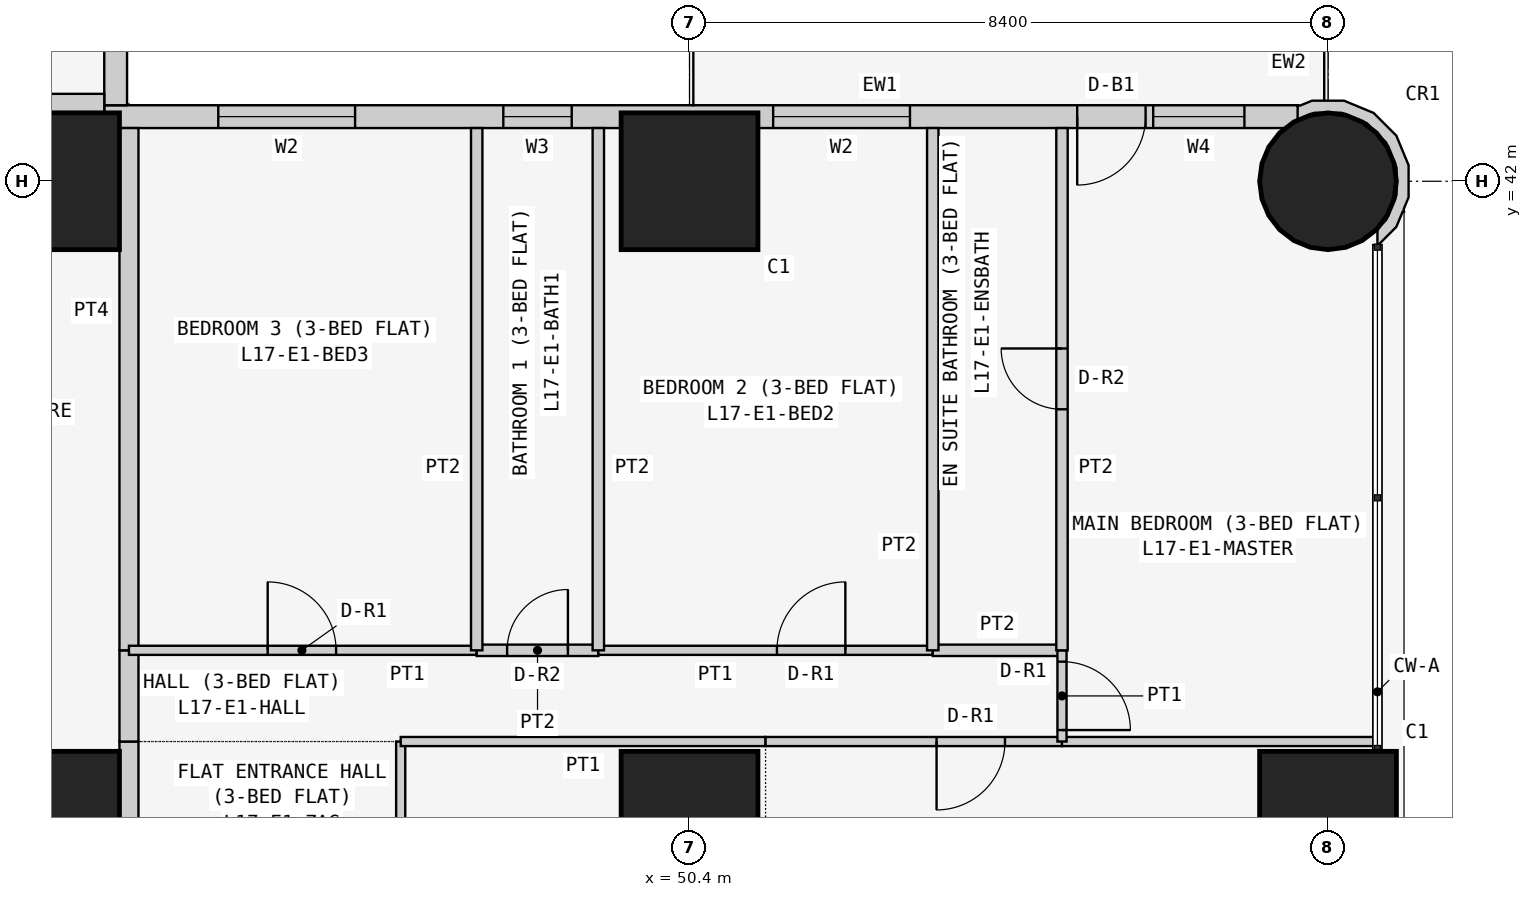
"""IFC4 building model, lengths in metres.
Left out: names, types, materials, properties, quantities, classifications, styles, units other than length and angle.
Written with IfcOpenShell. Run it as: python <this file> out.ifc"""

import sys

from ifc_helpers import new_model, si_unit, direction, frame, frame_2d, origin, origin_2d, place, context, subcontext, project, spatial, polyline, rectangle, circle, outline, extrude, element, fill, save


model = new_model("IFC4")
c1 = context("Model", 3, precision=1e-05, world=origin(), true_north=direction((0.0, 1.0)))
c2 = subcontext(c1, "Body", "Model", "MODEL_VIEW")
j1 = project(units=[si_unit("LENGTHUNIT", "METRE"), si_unit("PLANEANGLEUNIT", "RADIAN")], contexts=[c1])
p1 = place(None, origin())
s1 = spatial("IfcSite", under=j1, at=p1, CompositionType="ELEMENT")
p2 = place(p1, origin())
s2 = spatial("IfcBuilding", under=s1, at=p2, CompositionType="ELEMENT")
p3 = place(p2, frame((0.0, 0.0, 70.5)))
s3 = spatial("IfcBuildingStorey", under=s2, at=p3, CompositionType="ELEMENT", Elevation=70.5)
for number, where, z_axis, x_axis in (
    (1, (42.0, 33.6, 0.0), (0.0, 0.0, 1.0), (1.0, 0.0, 0.0)),
    (2, (42.0, 42.0, 0.0), (0.0, 0.0, 1.0), (1.0, 0.0, 0.0)),
    (3, (50.4, 33.6, 0.0), (0.0, 0.0, 1.0), (1.0, 0.0, 0.0)),
    (4, (50.4, 42.0, 0.0), (0.0, 0.0, 1.0), (1.0, 0.0, 0.0)),
    (5, (58.8, 33.6, 0.0), (0.0, 0.0, 1.0), (1.0, 0.0, 0.0)),
):
    element("IfcColumn", number, at=place(p3, frame(where, z_axis=z_axis, x_axis=x_axis)), inside=s3, PredefinedType="COLUMN", context=c2, shape_type="SweptSolid", body=[
        extrude(rectangle(XDim=1.8, YDim=1.8, at=origin_2d()), origin(), (0.0, 0.0, 1.0), 3.6),
    ])
p4 = place(p3, frame((58.8, 42.0, 0.0), z_axis=(0.0, 0.0, 1.0), x_axis=(1.0, 0.0, 0.0)))
e6 = element("IfcColumn", 6, at=p4, inside=s3, PredefinedType="COLUMN", context=c2, shape_type="SweptSolid", body=[
    extrude(circle(Radius=0.9, at=origin_2d()), origin(), (0.0, 0.0, 1.0), 3.6),
])
p5 = place(p3, frame((58.4, 42.85, 0.0), z_axis=(0.0, 0.0, 1.0), x_axis=(-1.0, 0.0, 0.0)))
e7 = element("IfcWall", 7, at=p5, inside=s3, PredefinedType="SOLIDWALL", context=c2, shape_type="SweptSolid", body=[
    extrude(rectangle(XDim=15.7, YDim=0.3, at=frame_2d((7.85, 0.0))), origin(), (0.0, 0.0, 1.0), 3.45),
])
p6 = place(p5, frame((12.4, 0.0, 0.9)))
e8 = element("IfcOpeningElement", 8, at=p6, cuts=e7, PredefinedType="OPENING", context=c2, shape_type="SweptSolid", body=[
    extrude(rectangle(XDim=1.8, YDim=1.5, at=frame_2d((0.9, 0.75))), frame((0.0, 0.16, 0.0), z_axis=(0.0, -1.0, 0.0), x_axis=(1.0, 0.0, 0.0)), (0.0, 0.0, 1.0), 0.32),
])
p7 = place(p5, frame((9.55, 0.0, 1.5)))
e9 = element("IfcOpeningElement", 9, at=p7, cuts=e7, PredefinedType="OPENING", context=c2, shape_type="SweptSolid", body=[
    extrude(rectangle(XDim=0.9, YDim=0.7, at=frame_2d((0.45, 0.35))), frame((0.0, 0.16, 0.0), z_axis=(0.0, -1.0, 0.0), x_axis=(1.0, 0.0, 0.0)), (0.0, 0.0, 1.0), 0.32),
])
p8 = place(p5, frame((5.1, 0.0, 0.9)))
e10 = element("IfcOpeningElement", 10, at=p8, cuts=e7, PredefinedType="OPENING", context=c2, shape_type="SweptSolid", body=[
    extrude(rectangle(XDim=1.8, YDim=1.5, at=frame_2d((0.9, 0.75))), frame((0.0, 0.16, 0.0), z_axis=(0.0, -1.0, 0.0), x_axis=(1.0, 0.0, 0.0)), (0.0, 0.0, 1.0), 0.32),
])
p9 = place(p5, frame((2.0, 0.0, 0.0)))
e11 = element("IfcOpeningElement", 11, at=p9, cuts=e7, PredefinedType="OPENING", context=c2, shape_type="SweptSolid", body=[
    extrude(rectangle(XDim=0.9, YDim=2.4, at=frame_2d((0.45, 1.2))), frame((0.0, 0.16, 0.0), z_axis=(0.0, -1.0, 0.0), x_axis=(1.0, 0.0, 0.0)), (0.0, 0.0, 1.0), 0.32),
])
p10 = place(p5, frame((0.7, 0.0, 0.9)))
e12 = element("IfcOpeningElement", 12, at=p10, cuts=e7, PredefinedType="OPENING", context=c2, shape_type="SweptSolid", body=[
    extrude(rectangle(XDim=1.2, YDim=1.5, at=frame_2d((0.6, 0.75))), frame((0.0, 0.16, 0.0), z_axis=(0.0, -1.0, 0.0), x_axis=(1.0, 0.0, 0.0)), (0.0, 0.0, 1.0), 0.32),
])
p11 = place(p3, frame((42.85, 43.0, 0.0), z_axis=(0.0, 0.0, 1.0), x_axis=(0.0, 1.0, 0.0)))
e13 = element("IfcWall", 13, at=p11, inside=s3, PredefinedType="SOLIDWALL", context=c2, shape_type="SweptSolid", body=[
    extrude(rectangle(XDim=15.4, YDim=0.3, at=frame_2d((7.7, 0.0))), origin(), (0.0, 0.0, 1.0), 3.45),
])
p12 = place(p11, frame((1.2, 0.0, 0.9)))
e14 = element("IfcOpeningElement", 14, at=p12, cuts=e13, PredefinedType="OPENING", context=c2, shape_type="SweptSolid", body=[
    extrude(rectangle(XDim=1.8, YDim=1.5, at=frame_2d((0.9, 0.75))), frame((0.0, 0.16, 0.0), z_axis=(0.0, -1.0, 0.0), x_axis=(1.0, 0.0, 0.0)), (0.0, 0.0, 1.0), 0.32),
])
p13 = place(p11, frame((4.95, 0.0, 1.5)))
e15 = element("IfcOpeningElement", 15, at=p13, cuts=e13, PredefinedType="OPENING", context=c2, shape_type="SweptSolid", body=[
    extrude(rectangle(XDim=0.9, YDim=0.7, at=frame_2d((0.45, 0.35))), frame((0.0, 0.16, 0.0), z_axis=(0.0, -1.0, 0.0), x_axis=(1.0, 0.0, 0.0)), (0.0, 0.0, 1.0), 0.32),
])
p14 = place(p11, frame((8.5, 0.0, 0.9)))
e16 = element("IfcOpeningElement", 16, at=p14, cuts=e13, PredefinedType="OPENING", context=c2, shape_type="SweptSolid", body=[
    extrude(rectangle(XDim=1.8, YDim=1.5, at=frame_2d((0.9, 0.75))), frame((0.0, 0.16, 0.0), z_axis=(0.0, -1.0, 0.0), x_axis=(1.0, 0.0, 0.0)), (0.0, 0.0, 1.0), 0.32),
])
p15 = place(p11, frame((12.5, 0.0, 0.0)))
e17 = element("IfcOpeningElement", 17, at=p15, cuts=e13, PredefinedType="OPENING", context=c2, shape_type="SweptSolid", body=[
    extrude(rectangle(XDim=0.9, YDim=2.4, at=frame_2d((0.45, 1.2))), frame((0.0, 0.16, 0.0), z_axis=(0.0, -1.0, 0.0), x_axis=(1.0, 0.0, 0.0)), (0.0, 0.0, 1.0), 0.32),
])
p16 = place(p11, frame((13.5, 0.0, 0.9)))
e18 = element("IfcOpeningElement", 18, at=p16, cuts=e13, PredefinedType="OPENING", context=c2, shape_type="SweptSolid", body=[
    extrude(rectangle(XDim=1.2, YDim=1.5, at=frame_2d((0.6, 0.75))), frame((0.0, 0.16, 0.0), z_axis=(0.0, -1.0, 0.0), x_axis=(1.0, 0.0, 0.0)), (0.0, 0.0, 1.0), 0.32),
])
p17 = place(p3, frame((59.411, 41.233, 0.0), z_axis=(0.0, 0.0, 1.0), x_axis=(0.926129809145, 0.377204953059, 0.0)))
e19 = element("IfcWall", 19, at=p17, inside=s3, PredefinedType="SOLIDWALL", context=c2, shape_type="SweptSolid", body=[
    extrude(outline(polyline([(0.626, 0.345), (0.785, 0.736), (0.782, 1.157), (0.619, 1.546), (0.319, 1.843), (-0.072, 2.002), (-0.24, 2.001), (-0.27, 2.017), (-0.37, 1.841), (-0.102, 1.842), (0.23, 1.707), (0.485, 1.455), (0.624, 1.125), (0.626, 0.766), (0.491, 0.434), (0.238, 0.179), (0.09, 0.117), (0.011, -0.078), (0.024, -0.083), (0.329, 0.045), (0.48, 0.198), (0.499, 0.193), (0.508, 0.225), (0.626, 0.345)])), origin(), (0.0, 0.0, 1.0), 3.45),
])
p18 = place(p3, frame((36.229, 43.025, 0.0), z_axis=(0.0, 0.0, 1.0), x_axis=(1.0, 0.0, 0.0)))
e20 = element("IfcWall", 20, at=p18, inside=s3, PredefinedType="PARTITIONING", context=c2, shape_type="SweptSolid", body=[
    extrude(rectangle(XDim=6.471, YDim=0.25, at=frame_2d((3.235, 0.0))), origin(), (0.0, 0.0, 1.0), 3.45),
])
p19 = place(p3, frame((43.025, 34.629, 0.0), z_axis=(0.0, 0.0, 1.0), x_axis=(0.0, -1.0, 0.0)))
e21 = element("IfcWall", 21, at=p19, inside=s3, PredefinedType="PARTITIONING", context=c2, shape_type="SweptSolid", body=[
    extrude(rectangle(XDim=5.229, YDim=0.25, at=frame_2d((2.615, 0.0))), origin(), (0.0, 0.0, 1.0), 3.45),
])
p20 = place(p19, frame((2.129, 0.0, 0.0)))
e22 = element("IfcOpeningElement", 22, at=p20, cuts=e21, PredefinedType="OPENING", context=c2, shape_type="SweptSolid", body=[
    extrude(rectangle(XDim=1.0, YDim=2.1, at=frame_2d((0.5, 1.05))), frame((0.0, 0.135, 0.0), z_axis=(0.0, -1.0, 0.0), x_axis=(1.0, 0.0, 0.0)), (0.0, 0.0, 1.0), 0.27),
])
p21 = place(p3, frame((43.025, 35.829, 0.0), z_axis=(0.0, 0.0, 1.0), x_axis=(0.0, -1.0, 0.0)))
e23 = element("IfcWall", 23, at=p21, inside=s3, PredefinedType="PARTITIONING", context=c2, shape_type="SweptSolid", body=[
    extrude(rectangle(XDim=1.2, YDim=0.25, at=frame_2d((0.6, 0.0))), origin(), (0.0, 0.0, 1.0), 3.45),
])
p22 = place(p3, frame((43.025, 42.7, 0.0), z_axis=(0.0, 0.0, 1.0), x_axis=(0.0, -1.0, 0.0)))
e24 = element("IfcWall", 24, at=p22, inside=s3, PredefinedType="PARTITIONING", context=c2, shape_type="SweptSolid", body=[
    extrude(rectangle(XDim=6.871, YDim=0.25, at=frame_2d((3.436, 0.0))), origin(), (0.0, 0.0, 1.0), 3.45),
])
p23 = place(p3, frame((46.6, 29.4, 0.0), z_axis=(0.0, 0.0, 1.0), x_axis=(0.0, 1.0, 0.0)))
e25 = element("IfcWall", 25, at=p23, inside=s3, PredefinedType="PARTITIONING", context=c2, shape_type="SweptSolid", body=[
    extrude(rectangle(XDim=5.229, YDim=0.12, at=frame_2d((2.615, 0.0))), origin(), (0.0, 0.0, 1.0), 3.45),
])
p24 = place(p23, frame((1.05, 0.0, 0.0)))
e26 = element("IfcOpeningElement", 26, at=p24, cuts=e25, PredefinedType="OPENING", context=c2, shape_type="SweptSolid", body=[
    extrude(rectangle(XDim=0.9, YDim=2.1, at=frame_2d((0.45, 1.05))), frame((0.0, 0.07, 0.0), z_axis=(0.0, -1.0, 0.0), x_axis=(1.0, 0.0, 0.0)), (0.0, 0.0, 1.0), 0.14),
])
p25 = place(p3, frame((51.4, 34.629, 0.0), z_axis=(0.0, 0.0, 1.0), x_axis=(-1.0, 0.0, 0.0)))
e27 = element("IfcWall", 27, at=p25, inside=s3, PredefinedType="PARTITIONING", context=c2, shape_type="SweptSolid", body=[
    extrude(rectangle(XDim=4.8, YDim=0.12, at=frame_2d((2.4, 0.0))), origin(), (0.0, 0.0, 1.0), 3.45),
])
p26 = place(p3, frame((55.3, 34.629, 0.0), z_axis=(0.0, 0.0, 1.0), x_axis=(-1.0, 0.0, 0.0)))
e28 = element("IfcWall", 28, at=p26, inside=s3, PredefinedType="PARTITIONING", context=c2, shape_type="SweptSolid", body=[
    extrude(rectangle(XDim=3.9, YDim=0.12, at=frame_2d((1.95, 0.0))), origin(), (0.0, 0.0, 1.0), 3.45),
])
p27 = place(p26, frame((0.75, 0.0, 0.0)))
e29 = element("IfcOpeningElement", 29, at=p27, cuts=e28, PredefinedType="OPENING", context=c2, shape_type="SweptSolid", body=[
    extrude(rectangle(XDim=0.9, YDim=2.1, at=frame_2d((0.45, 1.05))), frame((0.0, 0.07, 0.0), z_axis=(0.0, -1.0, 0.0), x_axis=(1.0, 0.0, 0.0)), (0.0, 0.0, 1.0), 0.14),
])
p28 = place(p3, frame((59.45, 34.629, 0.0), z_axis=(0.0, 0.0, 1.0), x_axis=(-1.0, 0.0, 0.0)))
e30 = element("IfcWall", 30, at=p28, inside=s3, PredefinedType="PARTITIONING", context=c2, shape_type="SweptSolid", body=[
    extrude(rectangle(XDim=4.15, YDim=0.12, at=frame_2d((2.075, 0.0))), origin(), (0.0, 0.0, 1.0), 3.45),
])
p29 = place(p3, frame((47.6, 35.829, 0.0), z_axis=(0.0, 0.0, 1.0), x_axis=(-1.0, 0.0, 0.0)))
e31 = element("IfcWall", 31, at=p29, inside=s3, PredefinedType="PARTITIONING", context=c2, shape_type="SweptSolid", body=[
    extrude(rectangle(XDim=4.575, YDim=0.12, at=frame_2d((2.288, 0.0))), origin(), (0.0, 0.0, 1.0), 3.45),
])
p30 = place(p29, frame((1.85, 0.0, 0.0)))
e32 = element("IfcOpeningElement", 32, at=p30, cuts=e31, PredefinedType="OPENING", context=c2, shape_type="SweptSolid", body=[
    extrude(rectangle(XDim=0.9, YDim=2.1, at=frame_2d((0.45, 1.05))), frame((0.0, 0.07, 0.0), z_axis=(0.0, -1.0, 0.0), x_axis=(1.0, 0.0, 0.0)), (0.0, 0.0, 1.0), 0.14),
])
p31 = place(p3, frame((49.2, 35.829, 0.0), z_axis=(0.0, 0.0, 1.0), x_axis=(-1.0, 0.0, 0.0)))
e33 = element("IfcWall", 33, at=p31, inside=s3, PredefinedType="PARTITIONING", context=c2, shape_type="SweptSolid", body=[
    extrude(rectangle(XDim=1.6, YDim=0.15, at=frame_2d((0.8, 0.0))), origin(), (0.0, 0.0, 1.0), 3.45),
])
p32 = place(p31, frame((0.4, 0.0, 0.0)))
e34 = element("IfcOpeningElement", 34, at=p32, cuts=e33, PredefinedType="OPENING", context=c2, shape_type="SweptSolid", body=[
    extrude(rectangle(XDim=0.8, YDim=2.1, at=frame_2d((0.4, 1.05))), frame((0.0, 0.085, 0.0), z_axis=(0.0, -1.0, 0.0), x_axis=(1.0, 0.0, 0.0)), (0.0, 0.0, 1.0), 0.17),
])
p33 = place(p3, frame((53.6, 35.829, 0.0), z_axis=(0.0, 0.0, 1.0), x_axis=(-1.0, 0.0, 0.0)))
e35 = element("IfcWall", 35, at=p33, inside=s3, PredefinedType="PARTITIONING", context=c2, shape_type="SweptSolid", body=[
    extrude(rectangle(XDim=4.4, YDim=0.12, at=frame_2d((2.2, 0.0))), origin(), (0.0, 0.0, 1.0), 3.45),
])
p34 = place(p33, frame((1.15, 0.0, 0.0)))
e36 = element("IfcOpeningElement", 36, at=p34, cuts=e35, PredefinedType="OPENING", context=c2, shape_type="SweptSolid", body=[
    extrude(rectangle(XDim=0.9, YDim=2.1, at=frame_2d((0.45, 1.05))), frame((0.0, 0.07, 0.0), z_axis=(0.0, -1.0, 0.0), x_axis=(1.0, 0.0, 0.0)), (0.0, 0.0, 1.0), 0.14),
])
p35 = place(p3, frame((55.3, 35.829, 0.0), z_axis=(0.0, 0.0, 1.0), x_axis=(-1.0, 0.0, 0.0)))
e37 = element("IfcWall", 37, at=p35, inside=s3, PredefinedType="PARTITIONING", context=c2, shape_type="SweptSolid", body=[
    extrude(rectangle(XDim=1.7, YDim=0.15, at=frame_2d((0.85, 0.0))), origin(), (0.0, 0.0, 1.0), 3.45),
])
p36 = place(p3, frame((55.3, 34.629, 0.0), z_axis=(0.0, 0.0, 1.0), x_axis=(0.0, 1.0, 0.0)))
e38 = element("IfcWall", 38, at=p36, inside=s3, PredefinedType="PARTITIONING", context=c2, shape_type="SweptSolid", body=[
    extrude(rectangle(XDim=1.2, YDim=0.12, at=frame_2d((0.6, 0.0))), origin(), (0.0, 0.0, 1.0), 3.45),
])
p37 = place(p36, frame((0.151, 0.0, 0.0)))
e39 = element("IfcOpeningElement", 39, at=p37, cuts=e38, PredefinedType="OPENING", context=c2, shape_type="SweptSolid", body=[
    extrude(rectangle(XDim=0.9, YDim=2.1, at=frame_2d((0.45, 1.05))), frame((0.0, 0.07, 0.0), z_axis=(0.0, -1.0, 0.0), x_axis=(1.0, 0.0, 0.0)), (0.0, 0.0, 1.0), 0.14),
])
for number, where, z_axis, x_axis in (
    (40, (47.6, 35.829, 0.0), (0.0, 0.0, 1.0), (0.0, 1.0, 0.0)),
    (41, (49.2, 35.829, 0.0), (0.0, 0.0, 1.0), (0.0, 1.0, 0.0)),
    (42, (53.6, 35.829, 0.0), (0.0, 0.0, 1.0), (0.0, 1.0, 0.0)),
):
    element("IfcWall", number, at=place(p3, frame(where, z_axis=z_axis, x_axis=x_axis)), inside=s3, PredefinedType="PARTITIONING", context=c2, shape_type="SweptSolid", body=[
        extrude(rectangle(XDim=6.871, YDim=0.15, at=frame_2d((3.436, 0.0))), origin(), (0.0, 0.0, 1.0), 3.45),
    ])
p38 = place(p3, frame((55.3, 35.829, 0.0), z_axis=(0.0, 0.0, 1.0), x_axis=(0.0, 1.0, 0.0)))
e43 = element("IfcWall", 43, at=p38, inside=s3, PredefinedType="PARTITIONING", context=c2, shape_type="SweptSolid", body=[
    extrude(rectangle(XDim=6.871, YDim=0.15, at=frame_2d((3.436, 0.0))), origin(), (0.0, 0.0, 1.0), 3.45),
])
p39 = place(p38, frame((3.171, 0.0, 0.0)))
e44 = element("IfcOpeningElement", 44, at=p39, cuts=e43, PredefinedType="OPENING", context=c2, shape_type="SweptSolid", body=[
    extrude(rectangle(XDim=0.8, YDim=2.1, at=frame_2d((0.4, 1.05))), frame((0.0, 0.085, 0.0), z_axis=(0.0, -1.0, 0.0), x_axis=(1.0, 0.0, 0.0)), (0.0, 0.0, 1.0), 0.17),
])
p40 = place(p6, origin())
e45 = element("IfcWindow", 45, at=p40, inside=s3, PartitioningType="SINGLE_PANEL", PredefinedType="WINDOW", context=c2, shape_type="SweptSolid", body=[
    extrude(rectangle(XDim=1.8, YDim=1.5, at=frame_2d((0.9, 0.75))), frame((0.0, 0.03, 0.0), z_axis=(0.0, -1.0, 0.0), x_axis=(1.0, 0.0, 0.0)), (0.0, 0.0, 1.0), 0.06),
])
fill(e8, e45)
p41 = place(p7, origin())
e46 = element("IfcWindow", 46, at=p41, inside=s3, PartitioningType="SINGLE_PANEL", PredefinedType="WINDOW", context=c2, shape_type="SweptSolid", body=[
    extrude(rectangle(XDim=0.9, YDim=0.7, at=frame_2d((0.45, 0.35))), frame((0.0, 0.03, 0.0), z_axis=(0.0, -1.0, 0.0), x_axis=(1.0, 0.0, 0.0)), (0.0, 0.0, 1.0), 0.06),
])
fill(e9, e46)
p42 = place(p8, origin())
e47 = element("IfcWindow", 47, at=p42, inside=s3, PartitioningType="SINGLE_PANEL", PredefinedType="WINDOW", context=c2, shape_type="SweptSolid", body=[
    extrude(rectangle(XDim=1.8, YDim=1.5, at=frame_2d((0.9, 0.75))), frame((0.0, 0.03, 0.0), z_axis=(0.0, -1.0, 0.0), x_axis=(1.0, 0.0, 0.0)), (0.0, 0.0, 1.0), 0.06),
])
fill(e10, e47)
p43 = place(p9, origin())
e48 = element("IfcDoor", 48, at=p43, inside=s3, OperationType="SINGLE_SWING_RIGHT", PredefinedType="DOOR", context=c2, shape_type="SweptSolid", body=[
    extrude(rectangle(XDim=0.9, YDim=2.4, at=frame_2d((0.45, 1.2))), frame((0.0, 0.025, 0.0), z_axis=(0.0, -1.0, 0.0), x_axis=(1.0, 0.0, 0.0)), (0.0, 0.0, 1.0), 0.05),
])
fill(e11, e48)
p44 = place(p10, origin())
e49 = element("IfcWindow", 49, at=p44, inside=s3, PartitioningType="SINGLE_PANEL", PredefinedType="WINDOW", context=c2, shape_type="SweptSolid", body=[
    extrude(rectangle(XDim=1.2, YDim=1.5, at=frame_2d((0.6, 0.75))), frame((0.0, 0.03, 0.0), z_axis=(0.0, -1.0, 0.0), x_axis=(1.0, 0.0, 0.0)), (0.0, 0.0, 1.0), 0.06),
])
fill(e12, e49)
p45 = place(p27, origin())
e50 = element("IfcDoor", 50, at=p45, inside=s3, OperationType="SINGLE_SWING_RIGHT", PredefinedType="DOOR", context=c2, shape_type="SweptSolid", body=[
    extrude(rectangle(XDim=0.9, YDim=2.1, at=frame_2d((0.45, 1.05))), frame((0.0, 0.025, 0.0), z_axis=(0.0, -1.0, 0.0), x_axis=(1.0, 0.0, 0.0)), (0.0, 0.0, 1.0), 0.05),
])
fill(e29, e50)
p46 = place(p30, frame((0.9, 0.0, 0.0), z_axis=(0.0, 0.0, 1.0), x_axis=(-1.0, 0.0, 0.0)))
e51 = element("IfcDoor", 51, at=p46, inside=s3, OperationType="SINGLE_SWING_LEFT", PredefinedType="DOOR", context=c2, shape_type="SweptSolid", body=[
    extrude(rectangle(XDim=0.9, YDim=2.1, at=frame_2d((0.45, 1.05))), frame((0.0, 0.025, 0.0), z_axis=(0.0, -1.0, 0.0), x_axis=(1.0, 0.0, 0.0)), (0.0, 0.0, 1.0), 0.05),
])
fill(e32, e51)
p47 = place(p32, frame((0.8, 0.0, 0.0), z_axis=(0.0, 0.0, 1.0), x_axis=(-1.0, 0.0, 0.0)))
e52 = element("IfcDoor", 52, at=p47, inside=s3, OperationType="SINGLE_SWING_RIGHT", PredefinedType="DOOR", context=c2, shape_type="SweptSolid", body=[
    extrude(rectangle(XDim=0.8, YDim=2.1, at=frame_2d((0.4, 1.05))), frame((0.0, 0.025, 0.0), z_axis=(0.0, -1.0, 0.0), x_axis=(1.0, 0.0, 0.0)), (0.0, 0.0, 1.0), 0.05),
])
fill(e34, e52)
p48 = place(p34, frame((0.9, 0.0, 0.0), z_axis=(0.0, 0.0, 1.0), x_axis=(-1.0, 0.0, 0.0)))
e53 = element("IfcDoor", 53, at=p48, inside=s3, OperationType="SINGLE_SWING_RIGHT", PredefinedType="DOOR", context=c2, shape_type="SweptSolid", body=[
    extrude(rectangle(XDim=0.9, YDim=2.1, at=frame_2d((0.45, 1.05))), frame((0.0, 0.025, 0.0), z_axis=(0.0, -1.0, 0.0), x_axis=(1.0, 0.0, 0.0)), (0.0, 0.0, 1.0), 0.05),
])
fill(e36, e53)
p49 = place(p37, frame((0.9, 0.0, 0.0), z_axis=(0.0, 0.0, 1.0), x_axis=(-1.0, 0.0, 0.0)))
e54 = element("IfcDoor", 54, at=p49, inside=s3, OperationType="SINGLE_SWING_RIGHT", PredefinedType="DOOR", context=c2, shape_type="SweptSolid", body=[
    extrude(rectangle(XDim=0.9, YDim=2.1, at=frame_2d((0.45, 1.05))), frame((0.0, 0.025, 0.0), z_axis=(0.0, -1.0, 0.0), x_axis=(1.0, 0.0, 0.0)), (0.0, 0.0, 1.0), 0.05),
])
fill(e39, e54)
p50 = place(p39, origin())
e55 = element("IfcDoor", 55, at=p50, inside=s3, OperationType="SINGLE_SWING_RIGHT", PredefinedType="DOOR", context=c2, shape_type="SweptSolid", body=[
    extrude(rectangle(XDim=0.8, YDim=2.1, at=frame_2d((0.4, 1.05))), frame((0.0, 0.025, 0.0), z_axis=(0.0, -1.0, 0.0), x_axis=(1.0, 0.0, 0.0)), (0.0, 0.0, 1.0), 0.05),
])
fill(e44, e55)
save(model, sys.argv[1])
